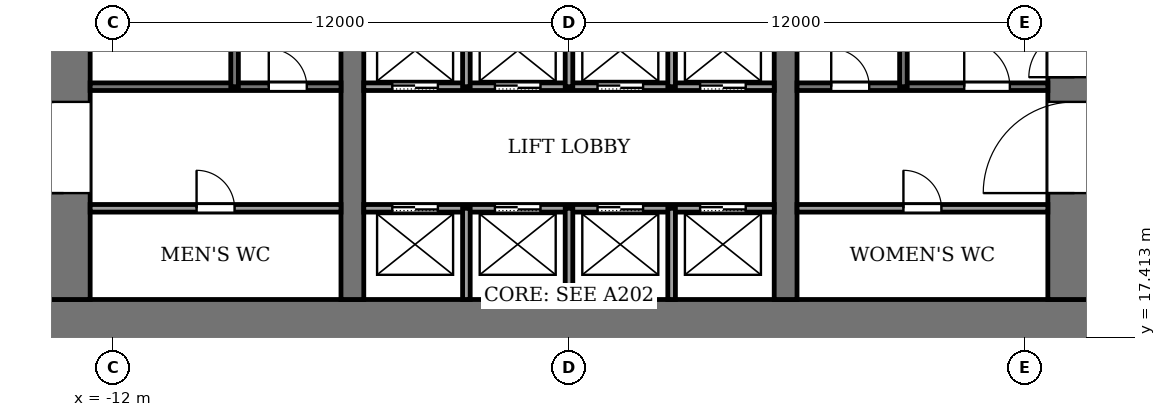
"""IFC4 building model, lengths in metres.
Left out: names, types, materials, properties, quantities, classifications, styles, units other than length and angle.
Written with IfcOpenShell. Run it as: python <this file> out.ifc"""

import sys

from ifc_helpers import new_model, si_unit, direction, frame, frame_2d, origin, place, context, subcontext, project, spatial, rectangle, extrude, element, fill, save


model = new_model("IFC4")
c1 = context("Model", 3, precision=1e-05, world=origin(), true_north=direction((0.0, 1.0)))
c2 = subcontext(c1, "Body", "Model", "MODEL_VIEW")
j1 = project(units=[si_unit("LENGTHUNIT", "METRE"), si_unit("PLANEANGLEUNIT", "RADIAN")], contexts=[c1])
p1 = place(None, origin())
s1 = spatial("IfcSite", under=j1, at=p1, CompositionType="ELEMENT")
p2 = place(p1, origin())
s2 = spatial("IfcBuilding", under=s1, at=p2, CompositionType="ELEMENT")
p3 = place(p2, origin())
s3 = spatial("IfcBuildingStorey", under=s2, at=p3, CompositionType="ELEMENT", Elevation=0.0)
p4 = place(p3, frame((-14.0, 17.7, -0.45), z_axis=(0.0, 0.0, 1.0), x_axis=(1.0, 0.0, 0.0)))
e1 = element("IfcWall", 1, at=p4, inside=s3, PredefinedType="SHEAR", context=c2, shape_type="SweptSolid", body=[
    extrude(rectangle(XDim=28.0, YDim=1.4, at=frame_2d((14.0, 0.0))), origin(), (0.0, 0.0, 1.0), 9.32),
])
p5 = place(p3, frame((-13.3, 18.4, -0.45), z_axis=(0.0, 0.0, 1.0), x_axis=(0.0, 1.0, 0.0)))
e2 = element("IfcWall", 2, at=p5, inside=s3, PredefinedType="SHEAR", context=c2, shape_type="SweptSolid", body=[
    extrude(rectangle(XDim=19.2, YDim=1.4, at=frame_2d((9.6, 0.0))), origin(), (0.0, 0.0, 1.0), 9.32),
])
p6 = place(p5, frame((2.8, 0.0, 0.45)))
e3 = element("IfcOpeningElement", 3, at=p6, cuts=e2, PredefinedType="OPENING", context=c2, shape_type="SweptSolid", body=[
    extrude(rectangle(XDim=2.4, YDim=2.4, at=frame_2d((1.2, 1.2))), frame((0.0, 0.71, 0.0), z_axis=(0.0, -1.0, 0.0), x_axis=(1.0, 0.0, 0.0)), (0.0, 0.0, 1.0), 1.42),
])
p7 = place(p5, frame((13.4, 0.0, 0.45)))
e4 = element("IfcOpeningElement", 4, at=p7, cuts=e2, PredefinedType="OPENING", context=c2, shape_type="SweptSolid", body=[
    extrude(rectangle(XDim=1.4, YDim=2.2, at=frame_2d((0.7, 1.1))), frame((0.0, 0.71, 0.0), z_axis=(0.0, -1.0, 0.0), x_axis=(1.0, 0.0, 0.0)), (0.0, 0.0, 1.0), 1.42),
])
p8 = place(p5, frame((11.3, 0.0, 0.45)))
e5 = element("IfcOpeningElement", 5, at=p8, cuts=e2, PredefinedType="OPENING", context=c2, shape_type="SweptSolid", body=[
    extrude(rectangle(XDim=1.2, YDim=2.2, at=frame_2d((0.6, 1.1))), frame((0.0, 0.71, 0.0), z_axis=(0.0, -1.0, 0.0), x_axis=(1.0, 0.0, 0.0)), (0.0, 0.0, 1.0), 1.42),
])
p9 = place(p3, frame((13.3, 18.4, -0.45), z_axis=(0.0, 0.0, 1.0), x_axis=(0.0, 1.0, 0.0)))
e6 = element("IfcWall", 6, at=p9, inside=s3, PredefinedType="SHEAR", context=c2, shape_type="SweptSolid", body=[
    extrude(rectangle(XDim=19.2, YDim=1.4, at=frame_2d((9.6, 0.0))), origin(), (0.0, 0.0, 1.0), 9.32),
])
p10 = place(p9, frame((2.8, 0.0, 0.45)))
e7 = element("IfcOpeningElement", 7, at=p10, cuts=e6, PredefinedType="OPENING", context=c2, shape_type="SweptSolid", body=[
    extrude(rectangle(XDim=2.4, YDim=2.4, at=frame_2d((1.2, 1.2))), frame((0.0, 0.71, 0.0), z_axis=(0.0, -1.0, 0.0), x_axis=(1.0, 0.0, 0.0)), (0.0, 0.0, 1.0), 1.42),
])
p11 = place(p9, frame((13.3, 0.0, 0.45)))
e8 = element("IfcOpeningElement", 8, at=p11, cuts=e6, PredefinedType="OPENING", context=c2, shape_type="SweptSolid", body=[
    extrude(rectangle(XDim=2.4, YDim=2.4, at=frame_2d((1.2, 1.2))), frame((0.0, 0.71, 0.0), z_axis=(0.0, -1.0, 0.0), x_axis=(1.0, 0.0, 0.0)), (0.0, 0.0, 1.0), 1.42),
])
p12 = place(p9, frame((5.85, 0.0, 0.45)))
e9 = element("IfcOpeningElement", 9, at=p12, cuts=e6, PredefinedType="OPENING", context=c2, shape_type="SweptSolid", body=[
    extrude(rectangle(XDim=1.2, YDim=2.2, at=frame_2d((0.6, 1.1))), frame((0.0, 0.71, 0.0), z_axis=(0.0, -1.0, 0.0), x_axis=(1.0, 0.0, 0.0)), (0.0, 0.0, 1.0), 1.42),
])
p13 = place(p9, frame((16.8, 0.0, 0.45)))
e10 = element("IfcOpeningElement", 10, at=p13, cuts=e6, PredefinedType="OPENING", context=c2, shape_type="SweptSolid", body=[
    extrude(rectangle(XDim=1.2, YDim=2.2, at=frame_2d((0.6, 1.1))), frame((0.0, 0.71, 0.0), z_axis=(0.0, -1.0, 0.0), x_axis=(1.0, 0.0, 0.0)), (0.0, 0.0, 1.0), 1.42),
])
p14 = place(p3, frame((-5.7, 18.4, -0.45), z_axis=(0.0, 0.0, 1.0), x_axis=(0.0, 1.0, 0.0)))
e11 = element("IfcWall", 11, at=p14, inside=s3, PredefinedType="SHEAR", context=c2, shape_type="SweptSolid", body=[
    extrude(rectangle(XDim=19.2, YDim=0.6, at=frame_2d((9.6, 0.0))), origin(), (0.0, 0.0, 1.0), 9.32),
])
p15 = place(p14, frame((8.35, 0.0, 0.45)))
e12 = element("IfcOpeningElement", 12, at=p15, cuts=e11, PredefinedType="OPENING", context=c2, shape_type="SweptSolid", body=[
    extrude(rectangle(XDim=0.9, YDim=2.1, at=frame_2d((0.45, 1.05))), frame((0.0, 0.31, 0.0), z_axis=(0.0, -1.0, 0.0), x_axis=(1.0, 0.0, 0.0)), (0.0, 0.0, 1.0), 0.62),
])
p16 = place(p3, frame((5.7, 18.4, -0.45), z_axis=(0.0, 0.0, 1.0), x_axis=(0.0, 1.0, 0.0)))
e13 = element("IfcWall", 13, at=p16, inside=s3, PredefinedType="SHEAR", context=c2, shape_type="SweptSolid", body=[
    extrude(rectangle(XDim=19.2, YDim=0.6, at=frame_2d((9.6, 0.0))), origin(), (0.0, 0.0, 1.0), 9.32),
])
p17 = place(p16, frame((13.3, 0.0, 0.45)))
e14 = element("IfcOpeningElement", 14, at=p17, cuts=e13, PredefinedType="OPENING", context=c2, shape_type="SweptSolid", body=[
    extrude(rectangle(XDim=2.4, YDim=2.4, at=frame_2d((1.2, 1.2))), frame((0.0, 0.31, 0.0), z_axis=(0.0, -1.0, 0.0), x_axis=(1.0, 0.0, 0.0)), (0.0, 0.0, 1.0), 0.62),
])
p18 = place(p3, frame((-12.6, 20.8, 0.0), z_axis=(0.0, 0.0, 1.0), x_axis=(1.0, 0.0, 0.0)))
e15 = element("IfcWall", 15, at=p18, inside=s3, PredefinedType="PARTITIONING", context=c2, shape_type="SweptSolid", body=[
    extrude(rectangle(XDim=6.6, YDim=0.2, at=frame_2d((3.3, 0.0))), origin(), (0.0, 0.0, 1.0), 8.87),
])
p19 = place(p18, frame((2.8, 0.0, 0.0)))
e16 = element("IfcOpeningElement", 16, at=p19, cuts=e15, PredefinedType="OPENING", context=c2, shape_type="SweptSolid", body=[
    extrude(rectangle(XDim=1.0, YDim=2.1, at=frame_2d((0.5, 1.05))), frame((0.0, 0.11, 0.0), z_axis=(0.0, -1.0, 0.0), x_axis=(1.0, 0.0, 0.0)), (0.0, 0.0, 1.0), 0.22),
])
p20 = place(p3, frame((-5.4, 20.8, 0.0), z_axis=(0.0, 0.0, 1.0), x_axis=(1.0, 0.0, 0.0)))
e17 = element("IfcWall", 17, at=p20, inside=s3, PredefinedType="PARTITIONING", context=c2, shape_type="SweptSolid", body=[
    extrude(rectangle(XDim=10.8, YDim=0.2, at=frame_2d((5.4, 0.0))), origin(), (0.0, 0.0, 1.0), 8.87),
])
p21 = place(p20, frame((0.75, 0.0, 0.0)))
e18 = element("IfcOpeningElement", 18, at=p21, cuts=e17, PredefinedType="OPENING", context=c2, shape_type="SweptSolid", body=[
    extrude(rectangle(XDim=1.2, YDim=2.2, at=frame_2d((0.6, 1.1))), frame((0.0, 0.11, 0.0), z_axis=(0.0, -1.0, 0.0), x_axis=(1.0, 0.0, 0.0)), (0.0, 0.0, 1.0), 0.22),
])
p22 = place(p20, frame((3.45, 0.0, 0.0)))
e19 = element("IfcOpeningElement", 19, at=p22, cuts=e17, PredefinedType="OPENING", context=c2, shape_type="SweptSolid", body=[
    extrude(rectangle(XDim=1.2, YDim=2.2, at=frame_2d((0.6, 1.1))), frame((0.0, 0.11, 0.0), z_axis=(0.0, -1.0, 0.0), x_axis=(1.0, 0.0, 0.0)), (0.0, 0.0, 1.0), 0.22),
])
p23 = place(p20, frame((6.15, 0.0, 0.0)))
e20 = element("IfcOpeningElement", 20, at=p23, cuts=e17, PredefinedType="OPENING", context=c2, shape_type="SweptSolid", body=[
    extrude(rectangle(XDim=1.2, YDim=2.2, at=frame_2d((0.6, 1.1))), frame((0.0, 0.11, 0.0), z_axis=(0.0, -1.0, 0.0), x_axis=(1.0, 0.0, 0.0)), (0.0, 0.0, 1.0), 0.22),
])
p24 = place(p20, frame((8.85, 0.0, 0.0)))
e21 = element("IfcOpeningElement", 21, at=p24, cuts=e17, PredefinedType="OPENING", context=c2, shape_type="SweptSolid", body=[
    extrude(rectangle(XDim=1.2, YDim=2.2, at=frame_2d((0.6, 1.1))), frame((0.0, 0.11, 0.0), z_axis=(0.0, -1.0, 0.0), x_axis=(1.0, 0.0, 0.0)), (0.0, 0.0, 1.0), 0.22),
])
p25 = place(p3, frame((6.0, 20.8, 0.0), z_axis=(0.0, 0.0, 1.0), x_axis=(1.0, 0.0, 0.0)))
e22 = element("IfcWall", 22, at=p25, inside=s3, PredefinedType="PARTITIONING", context=c2, shape_type="SweptSolid", body=[
    extrude(rectangle(XDim=6.6, YDim=0.2, at=frame_2d((3.3, 0.0))), origin(), (0.0, 0.0, 1.0), 8.87),
])
p26 = place(p25, frame((2.8, 0.0, 0.0)))
e23 = element("IfcOpeningElement", 23, at=p26, cuts=e22, PredefinedType="OPENING", context=c2, shape_type="SweptSolid", body=[
    extrude(rectangle(XDim=1.0, YDim=2.1, at=frame_2d((0.5, 1.05))), frame((0.0, 0.11, 0.0), z_axis=(0.0, -1.0, 0.0), x_axis=(1.0, 0.0, 0.0)), (0.0, 0.0, 1.0), 0.22),
])
p27 = place(p3, frame((-12.6, 24.0, 0.0), z_axis=(0.0, 0.0, 1.0), x_axis=(1.0, 0.0, 0.0)))
e24 = element("IfcWall", 24, at=p27, inside=s3, PredefinedType="PARTITIONING", context=c2, shape_type="SweptSolid", body=[
    extrude(rectangle(XDim=6.6, YDim=0.2, at=frame_2d((3.3, 0.0))), origin(), (0.0, 0.0, 1.0), 8.87),
])
p28 = place(p27, frame((4.7, 0.0, 0.0)))
e25 = element("IfcOpeningElement", 25, at=p28, cuts=e24, PredefinedType="OPENING", context=c2, shape_type="SweptSolid", body=[
    extrude(rectangle(XDim=1.0, YDim=2.1, at=frame_2d((0.5, 1.05))), frame((0.0, 0.11, 0.0), z_axis=(0.0, -1.0, 0.0), x_axis=(1.0, 0.0, 0.0)), (0.0, 0.0, 1.0), 0.22),
])
p29 = place(p3, frame((-5.4, 24.0, 0.0), z_axis=(0.0, 0.0, 1.0), x_axis=(1.0, 0.0, 0.0)))
e26 = element("IfcWall", 26, at=p29, inside=s3, PredefinedType="PARTITIONING", context=c2, shape_type="SweptSolid", body=[
    extrude(rectangle(XDim=10.8, YDim=0.2, at=frame_2d((5.4, 0.0))), origin(), (0.0, 0.0, 1.0), 8.87),
])
p30 = place(p29, frame((0.75, 0.0, 0.0)))
e27 = element("IfcOpeningElement", 27, at=p30, cuts=e26, PredefinedType="OPENING", context=c2, shape_type="SweptSolid", body=[
    extrude(rectangle(XDim=1.2, YDim=2.2, at=frame_2d((0.6, 1.1))), frame((0.0, 0.11, 0.0), z_axis=(0.0, -1.0, 0.0), x_axis=(1.0, 0.0, 0.0)), (0.0, 0.0, 1.0), 0.22),
])
p31 = place(p29, frame((3.45, 0.0, 0.0)))
e28 = element("IfcOpeningElement", 28, at=p31, cuts=e26, PredefinedType="OPENING", context=c2, shape_type="SweptSolid", body=[
    extrude(rectangle(XDim=1.2, YDim=2.2, at=frame_2d((0.6, 1.1))), frame((0.0, 0.11, 0.0), z_axis=(0.0, -1.0, 0.0), x_axis=(1.0, 0.0, 0.0)), (0.0, 0.0, 1.0), 0.22),
])
p32 = place(p29, frame((6.15, 0.0, 0.0)))
e29 = element("IfcOpeningElement", 29, at=p32, cuts=e26, PredefinedType="OPENING", context=c2, shape_type="SweptSolid", body=[
    extrude(rectangle(XDim=1.2, YDim=2.2, at=frame_2d((0.6, 1.1))), frame((0.0, 0.11, 0.0), z_axis=(0.0, -1.0, 0.0), x_axis=(1.0, 0.0, 0.0)), (0.0, 0.0, 1.0), 0.22),
])
p33 = place(p29, frame((8.85, 0.0, 0.0)))
e30 = element("IfcOpeningElement", 30, at=p33, cuts=e26, PredefinedType="OPENING", context=c2, shape_type="SweptSolid", body=[
    extrude(rectangle(XDim=1.2, YDim=2.2, at=frame_2d((0.6, 1.1))), frame((0.0, 0.11, 0.0), z_axis=(0.0, -1.0, 0.0), x_axis=(1.0, 0.0, 0.0)), (0.0, 0.0, 1.0), 0.22),
])
p34 = place(p3, frame((6.0, 24.0, 0.0), z_axis=(0.0, 0.0, 1.0), x_axis=(1.0, 0.0, 0.0)))
e31 = element("IfcWall", 31, at=p34, inside=s3, PredefinedType="PARTITIONING", context=c2, shape_type="SweptSolid", body=[
    extrude(rectangle(XDim=6.6, YDim=0.2, at=frame_2d((3.3, 0.0))), origin(), (0.0, 0.0, 1.0), 8.87),
])
p35 = place(p34, frame((0.9, 0.0, 0.0)))
e32 = element("IfcOpeningElement", 32, at=p35, cuts=e31, PredefinedType="OPENING", context=c2, shape_type="SweptSolid", body=[
    extrude(rectangle(XDim=1.0, YDim=2.1, at=frame_2d((0.5, 1.05))), frame((0.0, 0.11, 0.0), z_axis=(0.0, -1.0, 0.0), x_axis=(1.0, 0.0, 0.0)), (0.0, 0.0, 1.0), 0.22),
])
p36 = place(p34, frame((4.4, 0.0, 0.0)))
e33 = element("IfcOpeningElement", 33, at=p36, cuts=e31, PredefinedType="OPENING", context=c2, shape_type="SweptSolid", body=[
    extrude(rectangle(XDim=1.2, YDim=2.2, at=frame_2d((0.6, 1.1))), frame((0.0, 0.11, 0.0), z_axis=(0.0, -1.0, 0.0), x_axis=(1.0, 0.0, 0.0)), (0.0, 0.0, 1.0), 0.22),
])
p37 = place(p3, frame((-8.8, 24.0, 0.0), z_axis=(0.0, 0.0, 1.0), x_axis=(0.0, 1.0, 0.0)))
e34 = element("IfcWall", 34, at=p37, inside=s3, PredefinedType="PARTITIONING", context=c2, shape_type="SweptSolid", body=[
    extrude(rectangle(XDim=7.4, YDim=0.2, at=frame_2d((3.7, 0.0))), origin(), (0.0, 0.0, 1.0), 8.87),
])
p38 = place(p3, frame((-2.7, 18.4, 0.0), z_axis=(0.0, 0.0, 1.0), x_axis=(0.0, 1.0, 0.0)))
e35 = element("IfcWall", 35, at=p38, inside=s3, PredefinedType="PARTITIONING", context=c2, shape_type="SweptSolid", body=[
    extrude(rectangle(XDim=2.4, YDim=0.2, at=frame_2d((1.2, 0.0))), origin(), (0.0, 0.0, 1.0), 8.87),
])
p39 = place(p3, frame((-2.7, 24.0, 0.0), z_axis=(0.0, 0.0, 1.0), x_axis=(0.0, 1.0, 0.0)))
e36 = element("IfcWall", 36, at=p39, inside=s3, PredefinedType="PARTITIONING", context=c2, shape_type="SweptSolid", body=[
    extrude(rectangle(XDim=2.4, YDim=0.2, at=frame_2d((1.2, 0.0))), origin(), (0.0, 0.0, 1.0), 8.87),
])
p40 = place(p3, frame((0.0, 18.4, 0.0), z_axis=(0.0, 0.0, 1.0), x_axis=(0.0, 1.0, 0.0)))
e37 = element("IfcWall", 37, at=p40, inside=s3, PredefinedType="PARTITIONING", context=c2, shape_type="SweptSolid", body=[
    extrude(rectangle(XDim=2.4, YDim=0.2, at=frame_2d((1.2, 0.0))), origin(), (0.0, 0.0, 1.0), 8.87),
])
p41 = place(p3, frame((0.0, 24.0, 0.0), z_axis=(0.0, 0.0, 1.0), x_axis=(0.0, 1.0, 0.0)))
e38 = element("IfcWall", 38, at=p41, inside=s3, PredefinedType="PARTITIONING", context=c2, shape_type="SweptSolid", body=[
    extrude(rectangle(XDim=2.4, YDim=0.2, at=frame_2d((1.2, 0.0))), origin(), (0.0, 0.0, 1.0), 8.87),
])
p42 = place(p3, frame((2.7, 18.4, 0.0), z_axis=(0.0, 0.0, 1.0), x_axis=(0.0, 1.0, 0.0)))
e39 = element("IfcWall", 39, at=p42, inside=s3, PredefinedType="PARTITIONING", context=c2, shape_type="SweptSolid", body=[
    extrude(rectangle(XDim=2.4, YDim=0.2, at=frame_2d((1.2, 0.0))), origin(), (0.0, 0.0, 1.0), 8.87),
])
p43 = place(p3, frame((2.7, 24.0, 0.0), z_axis=(0.0, 0.0, 1.0), x_axis=(0.0, 1.0, 0.0)))
e40 = element("IfcWall", 40, at=p43, inside=s3, PredefinedType="PARTITIONING", context=c2, shape_type="SweptSolid", body=[
    extrude(rectangle(XDim=2.4, YDim=0.2, at=frame_2d((1.2, 0.0))), origin(), (0.0, 0.0, 1.0), 8.87),
])
p44 = place(p3, frame((8.8, 24.0, 0.0), z_axis=(0.0, 0.0, 1.0), x_axis=(0.0, 1.0, 0.0)))
e41 = element("IfcWall", 41, at=p44, inside=s3, PredefinedType="PARTITIONING", context=c2, shape_type="SweptSolid", body=[
    extrude(rectangle(XDim=7.4, YDim=0.2, at=frame_2d((3.7, 0.0))), origin(), (0.0, 0.0, 1.0), 8.87),
])
p45 = place(p21, origin())
e42 = element("IfcDoor", 42, at=p45, inside=s3, OperationType="SLIDING_TO_LEFT", PredefinedType="DOOR", context=c2, shape_type="SweptSolid", body=[
    extrude(rectangle(XDim=1.2, YDim=2.2, at=frame_2d((0.6, 1.1))), frame((0.0, 0.025, 0.0), z_axis=(0.0, -1.0, 0.0), x_axis=(1.0, 0.0, 0.0)), (0.0, 0.0, 1.0), 0.05),
])
fill(e18, e42)
p46 = place(p22, origin())
e43 = element("IfcDoor", 43, at=p46, inside=s3, OperationType="SLIDING_TO_LEFT", PredefinedType="DOOR", context=c2, shape_type="SweptSolid", body=[
    extrude(rectangle(XDim=1.2, YDim=2.2, at=frame_2d((0.6, 1.1))), frame((0.0, 0.025, 0.0), z_axis=(0.0, -1.0, 0.0), x_axis=(1.0, 0.0, 0.0)), (0.0, 0.0, 1.0), 0.05),
])
fill(e19, e43)
p47 = place(p23, origin())
e44 = element("IfcDoor", 44, at=p47, inside=s3, OperationType="SLIDING_TO_LEFT", PredefinedType="DOOR", context=c2, shape_type="SweptSolid", body=[
    extrude(rectangle(XDim=1.2, YDim=2.2, at=frame_2d((0.6, 1.1))), frame((0.0, 0.025, 0.0), z_axis=(0.0, -1.0, 0.0), x_axis=(1.0, 0.0, 0.0)), (0.0, 0.0, 1.0), 0.05),
])
fill(e20, e44)
p48 = place(p24, origin())
e45 = element("IfcDoor", 45, at=p48, inside=s3, OperationType="SLIDING_TO_LEFT", PredefinedType="DOOR", context=c2, shape_type="SweptSolid", body=[
    extrude(rectangle(XDim=1.2, YDim=2.2, at=frame_2d((0.6, 1.1))), frame((0.0, 0.025, 0.0), z_axis=(0.0, -1.0, 0.0), x_axis=(1.0, 0.0, 0.0)), (0.0, 0.0, 1.0), 0.05),
])
fill(e21, e45)
p49 = place(p30, origin())
e46 = element("IfcDoor", 46, at=p49, inside=s3, OperationType="SLIDING_TO_LEFT", PredefinedType="DOOR", context=c2, shape_type="SweptSolid", body=[
    extrude(rectangle(XDim=1.2, YDim=2.2, at=frame_2d((0.6, 1.1))), frame((0.0, 0.025, 0.0), z_axis=(0.0, -1.0, 0.0), x_axis=(1.0, 0.0, 0.0)), (0.0, 0.0, 1.0), 0.05),
])
fill(e27, e46)
p50 = place(p31, origin())
e47 = element("IfcDoor", 47, at=p50, inside=s3, OperationType="SLIDING_TO_LEFT", PredefinedType="DOOR", context=c2, shape_type="SweptSolid", body=[
    extrude(rectangle(XDim=1.2, YDim=2.2, at=frame_2d((0.6, 1.1))), frame((0.0, 0.025, 0.0), z_axis=(0.0, -1.0, 0.0), x_axis=(1.0, 0.0, 0.0)), (0.0, 0.0, 1.0), 0.05),
])
fill(e28, e47)
p51 = place(p32, origin())
e48 = element("IfcDoor", 48, at=p51, inside=s3, OperationType="SLIDING_TO_LEFT", PredefinedType="DOOR", context=c2, shape_type="SweptSolid", body=[
    extrude(rectangle(XDim=1.2, YDim=2.2, at=frame_2d((0.6, 1.1))), frame((0.0, 0.025, 0.0), z_axis=(0.0, -1.0, 0.0), x_axis=(1.0, 0.0, 0.0)), (0.0, 0.0, 1.0), 0.05),
])
fill(e29, e48)
p52 = place(p33, origin())
e49 = element("IfcDoor", 49, at=p52, inside=s3, OperationType="SLIDING_TO_LEFT", PredefinedType="DOOR", context=c2, shape_type="SweptSolid", body=[
    extrude(rectangle(XDim=1.2, YDim=2.2, at=frame_2d((0.6, 1.1))), frame((0.0, 0.025, 0.0), z_axis=(0.0, -1.0, 0.0), x_axis=(1.0, 0.0, 0.0)), (0.0, 0.0, 1.0), 0.05),
])
fill(e30, e49)
p53 = place(p19, origin())
e50 = element("IfcDoor", 50, at=p53, inside=s3, OperationType="SINGLE_SWING_LEFT", PredefinedType="DOOR", context=c2, shape_type="SweptSolid", body=[
    extrude(rectangle(XDim=1.0, YDim=2.1, at=frame_2d((0.5, 1.05))), frame((0.0, 0.025, 0.0), z_axis=(0.0, -1.0, 0.0), x_axis=(1.0, 0.0, 0.0)), (0.0, 0.0, 1.0), 0.05),
])
fill(e16, e50)
p54 = place(p26, origin())
e51 = element("IfcDoor", 51, at=p54, inside=s3, OperationType="SINGLE_SWING_RIGHT", PredefinedType="DOOR", context=c2, shape_type="SweptSolid", body=[
    extrude(rectangle(XDim=1.0, YDim=2.1, at=frame_2d((0.5, 1.05))), frame((0.0, 0.025, 0.0), z_axis=(0.0, -1.0, 0.0), x_axis=(1.0, 0.0, 0.0)), (0.0, 0.0, 1.0), 0.05),
])
fill(e23, e51)
p55 = place(p28, origin())
e52 = element("IfcDoor", 52, at=p55, inside=s3, OperationType="SINGLE_SWING_RIGHT", PredefinedType="DOOR", context=c2, shape_type="SweptSolid", body=[
    extrude(rectangle(XDim=1.0, YDim=2.1, at=frame_2d((0.5, 1.05))), frame((0.0, 0.025, 0.0), z_axis=(0.0, -1.0, 0.0), x_axis=(1.0, 0.0, 0.0)), (0.0, 0.0, 1.0), 0.05),
])
fill(e25, e52)
p56 = place(p35, origin())
e53 = element("IfcDoor", 53, at=p56, inside=s3, OperationType="SINGLE_SWING_LEFT", PredefinedType="DOOR", context=c2, shape_type="SweptSolid", body=[
    extrude(rectangle(XDim=1.0, YDim=2.1, at=frame_2d((0.5, 1.05))), frame((0.0, 0.025, 0.0), z_axis=(0.0, -1.0, 0.0), x_axis=(1.0, 0.0, 0.0)), (0.0, 0.0, 1.0), 0.05),
])
fill(e32, e53)
p57 = place(p36, origin())
e54 = element("IfcDoor", 54, at=p57, inside=s3, OperationType="SINGLE_SWING_LEFT", PredefinedType="DOOR", context=c2, shape_type="SweptSolid", body=[
    extrude(rectangle(XDim=1.2, YDim=2.2, at=frame_2d((0.6, 1.1))), frame((0.0, 0.025, 0.0), z_axis=(0.0, -1.0, 0.0), x_axis=(1.0, 0.0, 0.0)), (0.0, 0.0, 1.0), 0.05),
])
fill(e33, e54)
p58 = place(p6, origin())
e55 = element("IfcDoor", 55, at=p58, inside=s3, OperationType="DOUBLE_DOOR_SINGLE_SWING", PredefinedType="DOOR", context=c2, shape_type="SweptSolid", body=[
    extrude(rectangle(XDim=2.4, YDim=2.4, at=frame_2d((1.2, 1.2))), frame((0.0, 0.025, 0.0), z_axis=(0.0, -1.0, 0.0), x_axis=(1.0, 0.0, 0.0)), (0.0, 0.0, 1.0), 0.05),
])
fill(e3, e55)
p59 = place(p10, origin())
e56 = element("IfcDoor", 56, at=p59, inside=s3, OperationType="DOUBLE_DOOR_SINGLE_SWING", PredefinedType="DOOR", context=c2, shape_type="SweptSolid", body=[
    extrude(rectangle(XDim=2.4, YDim=2.4, at=frame_2d((1.2, 1.2))), frame((0.0, 0.025, 0.0), z_axis=(0.0, -1.0, 0.0), x_axis=(1.0, 0.0, 0.0)), (0.0, 0.0, 1.0), 0.05),
])
fill(e7, e56)
p60 = place(p12, origin())
e57 = element("IfcDoor", 57, at=p60, inside=s3, OperationType="SINGLE_SWING_LEFT", PredefinedType="DOOR", context=c2, shape_type="SweptSolid", body=[
    extrude(rectangle(XDim=1.2, YDim=2.2, at=frame_2d((0.6, 1.1))), frame((0.0, 0.7, 0.0), z_axis=(0.0, -1.0, 0.0), x_axis=(1.0, 0.0, 0.0)), (0.0, 0.0, 1.0), 0.05),
])
fill(e9, e57)
save(model, sys.argv[1])
